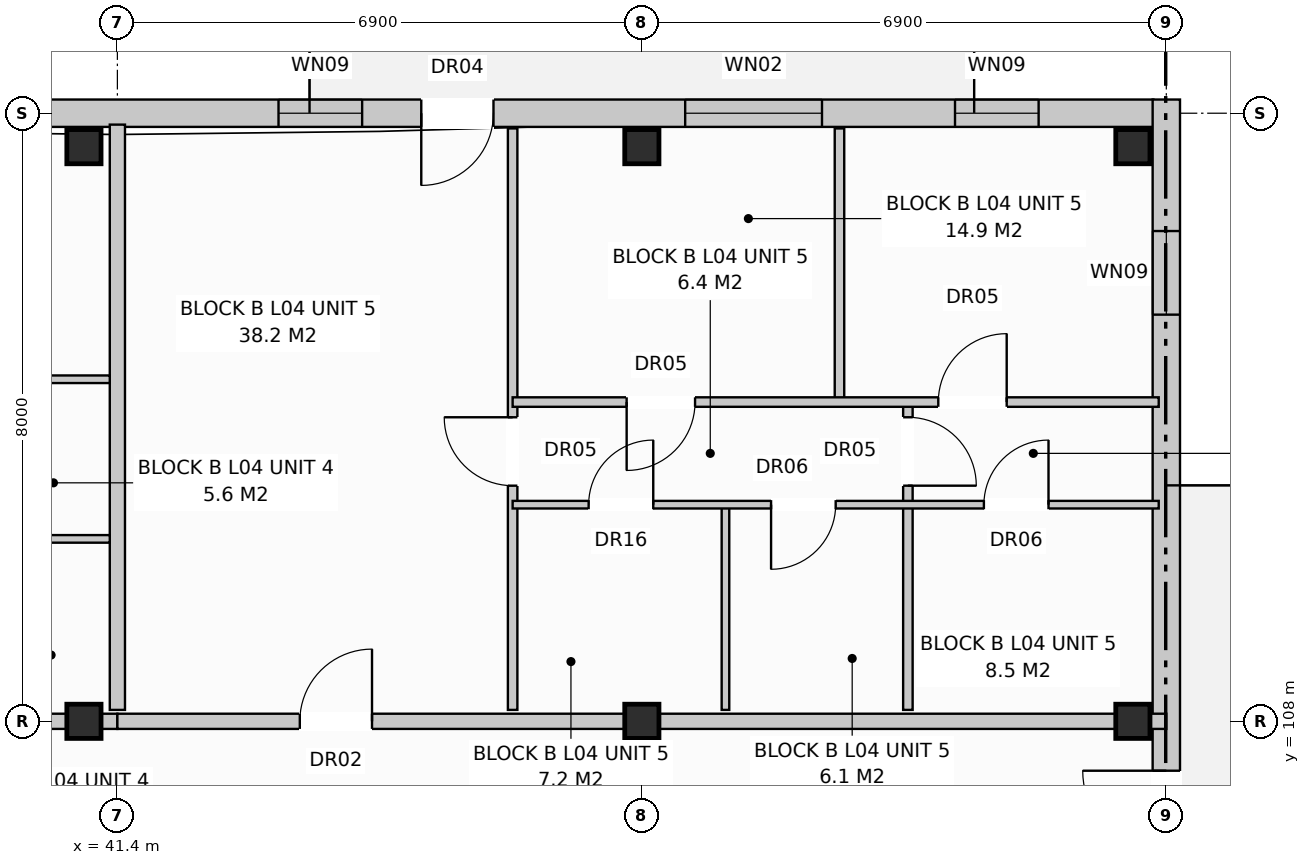
"""IFC4 building model, lengths in metres.
Left out: names, types, materials, properties, quantities, classifications, styles, units other than length and angle.
Written with IfcOpenShell. Run it as: python <this file> out.ifc"""

import sys

from ifc_helpers import new_model, si_unit, direction, frame, frame_2d, origin, origin_with_axes, origin_2d, place, context, subcontext, project, spatial, rectangle, extrude, element, fill, save


model = new_model("IFC4")
c1 = context("Model", 3, precision=1e-05, world=origin(), true_north=direction((0.0, 1.0)))
c2 = subcontext(c1, "Body", "Model", "MODEL_VIEW")
j1 = project(units=[si_unit("LENGTHUNIT", "METRE"), si_unit("PLANEANGLEUNIT", "RADIAN")], contexts=[c1])
p1 = place(None, origin())
s1 = spatial("IfcSite", under=j1, at=p1, CompositionType="ELEMENT")
p2 = place(p1, origin())
s2 = spatial("IfcBuilding", under=s1, at=p2, CompositionType="ELEMENT")
p3 = place(p2, frame((0.0, 0.0, 14.4)))
s3 = spatial("IfcBuildingStorey", under=s2, at=p3, CompositionType="ELEMENT", Elevation=14.4)
for number, where, z_axis, x_axis in (
    (1, (40.96, 108.0, 0.0), (0.0, 0.0, 1.0), (1.0, 0.0, 0.0)),
    (2, (40.96, 115.56, 0.0), (0.0, 0.0, 1.0), (1.0, 0.0, 0.0)),
    (3, (48.3, 108.0, 0.0), (0.0, 0.0, 1.0), (1.0, 0.0, 0.0)),
    (4, (48.3, 115.56, 0.0), (0.0, 0.0, 1.0), (1.0, 0.0, 0.0)),
    (5, (54.76, 108.0, 0.0), (0.0, 0.0, 1.0), (1.0, 0.0, 0.0)),
    (6, (54.76, 115.56, 0.0), (0.0, 0.0, 1.0), (1.0, 0.0, 0.0)),
):
    element("IfcColumn", number, at=place(p3, frame(where, z_axis=z_axis, x_axis=x_axis)), inside=s3, PredefinedType="COLUMN", context=c2, shape_type="SweptSolid", body=[
        extrude(rectangle(XDim=0.45, YDim=0.45, at=origin_2d()), origin(), (0.0, 0.0, 1.0), 3.2),
    ])
p4 = place(p3, frame((0.17, 116.0, 0.0), z_axis=(0.0, 0.0, 1.0), x_axis=(1.0, 0.0, 0.0)))
e7 = element("IfcWall", 7, at=p4, inside=s3, PredefinedType="STANDARD", context=c2, shape_type="SweptSolid", body=[
    extrude(rectangle(XDim=54.86, YDim=0.36, at=frame_2d((27.43, 0.0))), origin(), (0.0, 0.0, 1.0), 2.94),
])
p5 = place(p4, frame((3.815, 0.0, 0.0)))
e8 = element("IfcOpeningElement", 8, at=p5, cuts=e7, PredefinedType="OPENING", context=c2, shape_type="SweptSolid", body=[
    extrude(rectangle(XDim=0.95, YDim=2.1, at=frame_2d((0.475, 1.05))), frame((0.0, 0.192, 0.0), z_axis=(0.0, -1.0, 0.0), x_axis=(1.0, 0.0, 0.0)), (0.0, 0.0, 1.0), 0.384),
])
p6 = place(p4, frame((16.615, 0.0, 0.0)))
e9 = element("IfcOpeningElement", 9, at=p6, cuts=e7, PredefinedType="OPENING", context=c2, shape_type="SweptSolid", body=[
    extrude(rectangle(XDim=0.95, YDim=2.1, at=frame_2d((0.475, 1.05))), frame((0.0, 0.192, 0.0), z_axis=(0.0, -1.0, 0.0), x_axis=(1.0, 0.0, 0.0)), (0.0, 0.0, 1.0), 0.384),
])
p7 = place(p4, frame((30.115, 0.0, 0.0)))
e10 = element("IfcOpeningElement", 10, at=p7, cuts=e7, PredefinedType="OPENING", context=c2, shape_type="SweptSolid", body=[
    extrude(rectangle(XDim=0.95, YDim=2.1, at=frame_2d((0.475, 1.05))), frame((0.0, 0.192, 0.0), z_axis=(0.0, -1.0, 0.0), x_axis=(1.0, 0.0, 0.0)), (0.0, 0.0, 1.0), 0.384),
])
p8 = place(p4, frame((45.228, 0.0, 0.0)))
e11 = element("IfcOpeningElement", 11, at=p8, cuts=e7, PredefinedType="OPENING", context=c2, shape_type="SweptSolid", body=[
    extrude(rectangle(XDim=0.95, YDim=2.1, at=frame_2d((0.475, 1.05))), frame((0.0, 0.192, 0.0), z_axis=(0.0, -1.0, 0.0), x_axis=(1.0, 0.0, 0.0)), (0.0, 0.0, 1.0), 0.384),
])
p9 = place(p4, frame((1.55, 0.0, 0.8)))
e12 = element("IfcOpeningElement", 12, at=p9, cuts=e7, PredefinedType="OPENING", context=c2, shape_type="SweptSolid", body=[
    extrude(rectangle(XDim=1.9, YDim=1.85, at=frame_2d((0.95, 0.925))), frame((0.0, 0.192, 0.0), z_axis=(0.0, -1.0, 0.0), x_axis=(1.0, 0.0, 0.0)), (0.0, 0.0, 1.0), 0.384),
])
p10 = place(p4, frame((7.183, 0.0, 0.8)))
e13 = element("IfcOpeningElement", 13, at=p10, cuts=e7, PredefinedType="OPENING", context=c2, shape_type="SweptSolid", body=[
    extrude(rectangle(XDim=1.95, YDim=1.65, at=frame_2d((0.975, 0.825))), frame((0.0, 0.192, 0.0), z_axis=(0.0, -1.0, 0.0), x_axis=(1.0, 0.0, 0.0)), (0.0, 0.0, 1.0), 0.384),
])
p11 = place(p4, frame((10.85, 0.0, 0.72)))
e14 = element("IfcOpeningElement", 14, at=p11, cuts=e7, PredefinedType="OPENING", context=c2, shape_type="SweptSolid", body=[
    extrude(rectangle(XDim=1.1, YDim=1.5, at=frame_2d((0.55, 0.75))), frame((0.0, 0.192, 0.0), z_axis=(0.0, -1.0, 0.0), x_axis=(1.0, 0.0, 0.0)), (0.0, 0.0, 1.0), 0.384),
])
p12 = place(p4, frame((14.85, 0.0, 0.72)))
e15 = element("IfcOpeningElement", 15, at=p12, cuts=e7, PredefinedType="OPENING", context=c2, shape_type="SweptSolid", body=[
    extrude(rectangle(XDim=1.1, YDim=1.5, at=frame_2d((0.55, 0.75))), frame((0.0, 0.192, 0.0), z_axis=(0.0, -1.0, 0.0), x_axis=(1.0, 0.0, 0.0)), (0.0, 0.0, 1.0), 0.384),
])
p13 = place(p4, frame((18.125, 0.0, 0.8)))
e16 = element("IfcOpeningElement", 16, at=p13, cuts=e7, PredefinedType="OPENING", context=c2, shape_type="SweptSolid", body=[
    extrude(rectangle(XDim=1.95, YDim=1.65, at=frame_2d((0.975, 0.825))), frame((0.0, 0.192, 0.0), z_axis=(0.0, -1.0, 0.0), x_axis=(1.0, 0.0, 0.0)), (0.0, 0.0, 1.0), 0.384),
])
p14 = place(p4, frame((23.9, 0.0, 0.8)))
e17 = element("IfcOpeningElement", 17, at=p14, cuts=e7, PredefinedType="OPENING", context=c2, shape_type="SweptSolid", body=[
    extrude(rectangle(XDim=1.8, YDim=1.7, at=frame_2d((0.9, 0.85))), frame((0.0, 0.192, 0.0), z_axis=(0.0, -1.0, 0.0), x_axis=(1.0, 0.0, 0.0)), (0.0, 0.0, 1.0), 0.384),
])
p15 = place(p4, frame((28.35, 0.0, 0.72)))
e18 = element("IfcOpeningElement", 18, at=p15, cuts=e7, PredefinedType="OPENING", context=c2, shape_type="SweptSolid", body=[
    extrude(rectangle(XDim=1.1, YDim=1.5, at=frame_2d((0.55, 0.75))), frame((0.0, 0.192, 0.0), z_axis=(0.0, -1.0, 0.0), x_axis=(1.0, 0.0, 0.0)), (0.0, 0.0, 1.0), 0.384),
])
p16 = place(p4, frame((31.825, 0.0, 0.8)))
e19 = element("IfcOpeningElement", 19, at=p16, cuts=e7, PredefinedType="OPENING", context=c2, shape_type="SweptSolid", body=[
    extrude(rectangle(XDim=1.95, YDim=1.65, at=frame_2d((0.975, 0.825))), frame((0.0, 0.192, 0.0), z_axis=(0.0, -1.0, 0.0), x_axis=(1.0, 0.0, 0.0)), (0.0, 0.0, 1.0), 0.384),
])
p17 = place(p4, frame((35.4, 0.0, 0.8)))
e20 = element("IfcOpeningElement", 20, at=p17, cuts=e7, PredefinedType="OPENING", context=c2, shape_type="SweptSolid", body=[
    extrude(rectangle(XDim=1.8, YDim=1.7, at=frame_2d((0.9, 0.85))), frame((0.0, 0.192, 0.0), z_axis=(0.0, -1.0, 0.0), x_axis=(1.0, 0.0, 0.0)), (0.0, 0.0, 1.0), 0.384),
])
p18 = place(p4, frame((39.15, 0.0, 0.72)))
e21 = element("IfcOpeningElement", 21, at=p18, cuts=e7, PredefinedType="OPENING", context=c2, shape_type="SweptSolid", body=[
    extrude(rectangle(XDim=1.1, YDim=1.5, at=frame_2d((0.55, 0.75))), frame((0.0, 0.192, 0.0), z_axis=(0.0, -1.0, 0.0), x_axis=(1.0, 0.0, 0.0)), (0.0, 0.0, 1.0), 0.384),
])
p19 = place(p4, frame((43.35, 0.0, 0.72)))
e22 = element("IfcOpeningElement", 22, at=p19, cuts=e7, PredefinedType="OPENING", context=c2, shape_type="SweptSolid", body=[
    extrude(rectangle(XDim=1.1, YDim=1.5, at=frame_2d((0.55, 0.75))), frame((0.0, 0.192, 0.0), z_axis=(0.0, -1.0, 0.0), x_axis=(1.0, 0.0, 0.0)), (0.0, 0.0, 1.0), 0.384),
])
p20 = place(p4, frame((48.7, 0.0, 0.8)))
e23 = element("IfcOpeningElement", 23, at=p20, cuts=e7, PredefinedType="OPENING", context=c2, shape_type="SweptSolid", body=[
    extrude(rectangle(XDim=1.8, YDim=1.7, at=frame_2d((0.9, 0.85))), frame((0.0, 0.192, 0.0), z_axis=(0.0, -1.0, 0.0), x_axis=(1.0, 0.0, 0.0)), (0.0, 0.0, 1.0), 0.384),
])
p21 = place(p4, frame((52.25, 0.0, 0.72)))
e24 = element("IfcOpeningElement", 24, at=p21, cuts=e7, PredefinedType="OPENING", context=c2, shape_type="SweptSolid", body=[
    extrude(rectangle(XDim=1.1, YDim=1.5, at=frame_2d((0.55, 0.75))), frame((0.0, 0.192, 0.0), z_axis=(0.0, -1.0, 0.0), x_axis=(1.0, 0.0, 0.0)), (0.0, 0.0, 1.0), 0.384),
])
p22 = place(p3, frame((55.2, 97.42, 0.0), z_axis=(0.0, 0.0, 1.0), x_axis=(0.0, 1.0, 0.0)))
e25 = element("IfcWall", 25, at=p22, inside=s3, PredefinedType="STANDARD", context=c2, shape_type="SweptSolid", body=[
    extrude(rectangle(XDim=18.76, YDim=0.36, at=frame_2d((9.38, 0.0))), origin(), (0.0, 0.0, 1.0), 2.94),
])
p23 = place(p22, frame((8.83, 0.0, 0.0)))
e26 = element("IfcOpeningElement", 26, at=p23, cuts=e25, PredefinedType="OPENING", context=c2, shape_type="SweptSolid", body=[
    extrude(rectangle(XDim=1.1, YDim=2.1, at=frame_2d((0.55, 1.05))), frame((0.0, 0.192, 0.0), z_axis=(0.0, -1.0, 0.0), x_axis=(1.0, 0.0, 0.0)), (0.0, 0.0, 1.0), 0.384),
])
p24 = place(p22, frame((1.73, 0.0, 0.72)))
e27 = element("IfcOpeningElement", 27, at=p24, cuts=e25, PredefinedType="OPENING", context=c2, shape_type="SweptSolid", body=[
    extrude(rectangle(XDim=1.1, YDim=1.5, at=frame_2d((0.55, 0.75))), frame((0.0, 0.192, 0.0), z_axis=(0.0, -1.0, 0.0), x_axis=(1.0, 0.0, 0.0)), (0.0, 0.0, 1.0), 0.384),
])
p25 = place(p22, frame((15.93, 0.0, 0.72)))
e28 = element("IfcOpeningElement", 28, at=p25, cuts=e25, PredefinedType="OPENING", context=c2, shape_type="SweptSolid", body=[
    extrude(rectangle(XDim=1.1, YDim=1.5, at=frame_2d((0.55, 0.75))), frame((0.0, 0.192, 0.0), z_axis=(0.0, -1.0, 0.0), x_axis=(1.0, 0.0, 0.0)), (0.0, 0.0, 1.0), 0.384),
])
p26 = place(p3, frame((41.4, 108.15, 0.0), z_axis=(0.0, 0.0, 1.0), x_axis=(0.0, 1.0, 0.0)))
e29 = element("IfcWall", 29, at=p26, inside=s3, PredefinedType="PARTITIONING", context=c2, shape_type="SweptSolid", body=[
    extrude(rectangle(XDim=7.7, YDim=0.2, at=frame_2d((3.85, 0.0))), origin(), (0.0, 0.0, 1.0), 2.94),
])
p27 = place(p3, frame((34.5, 108.0, 0.0), z_axis=(0.0, 0.0, 1.0), x_axis=(1.0, 0.0, 0.0)))
e30 = element("IfcWall", 30, at=p27, inside=s3, PredefinedType="PARTITIONING", context=c2, shape_type="SweptSolid", body=[
    extrude(rectangle(XDim=6.9, YDim=0.2, at=frame_2d((3.45, 0.0))), origin(), (0.0, 0.0, 1.0), 2.38),
])
p28 = place(p27, frame((2.0, 0.0, 0.0)))
e31 = element("IfcOpeningElement", 31, at=p28, cuts=e30, PredefinedType="OPENING", context=c2, shape_type="SweptSolid", body=[
    extrude(rectangle(XDim=0.95, YDim=2.15, at=frame_2d((0.475, 1.075))), frame((0.0, 0.112, 0.0), z_axis=(0.0, -1.0, 0.0), x_axis=(1.0, 0.0, 0.0)), (0.0, 0.0, 1.0), 0.224),
])
for number, where, z_axis, x_axis in (
    (32, (38.4, 110.4, 0.0), (0.0, 0.0, 1.0), (1.0, 0.0, 0.0)),
    (33, (38.4, 112.5, 0.0), (0.0, 0.0, 1.0), (1.0, 0.0, 0.0)),
):
    element("IfcWall", number, at=place(p3, frame(where, z_axis=z_axis, x_axis=x_axis)), inside=s3, PredefinedType="PARTITIONING", context=c2, shape_type="SweptSolid", body=[
        extrude(rectangle(XDim=2.9, YDim=0.1, at=frame_2d((1.45, 0.0))), origin(), (0.0, 0.0, 1.0), 2.94),
    ])
p29 = place(p3, frame((41.4, 108.0, 0.0), z_axis=(0.0, 0.0, 1.0), x_axis=(1.0, 0.0, 0.0)))
e34 = element("IfcWall", 34, at=p29, inside=s3, PredefinedType="PARTITIONING", context=c2, shape_type="SweptSolid", body=[
    extrude(rectangle(XDim=13.8, YDim=0.2, at=frame_2d((6.9, 0.0))), origin(), (0.0, 0.0, 1.0), 2.38),
])
p30 = place(p29, frame((2.4, 0.0, 0.0)))
e35 = element("IfcOpeningElement", 35, at=p30, cuts=e34, PredefinedType="OPENING", context=c2, shape_type="SweptSolid", body=[
    extrude(rectangle(XDim=0.95, YDim=2.15, at=frame_2d((0.475, 1.075))), frame((0.0, 0.112, 0.0), z_axis=(0.0, -1.0, 0.0), x_axis=(1.0, 0.0, 0.0)), (0.0, 0.0, 1.0), 0.224),
])
p31 = place(p3, frame((46.6, 108.15, 0.0), z_axis=(0.0, 0.0, 1.0), x_axis=(0.0, 1.0, 0.0)))
e36 = element("IfcWall", 36, at=p31, inside=s3, PredefinedType="PARTITIONING", context=c2, shape_type="SweptSolid", body=[
    extrude(rectangle(XDim=7.65, YDim=0.125, at=frame_2d((3.825, 0.0))), origin(), (0.0, 0.0, 1.0), 2.94),
])
p32 = place(p31, frame((2.95, 0.0, 0.0)))
e37 = element("IfcOpeningElement", 37, at=p32, cuts=e36, PredefinedType="OPENING", context=c2, shape_type="SweptSolid", body=[
    extrude(rectangle(XDim=0.9, YDim=2.1, at=frame_2d((0.45, 1.05))), frame((0.0, 0.074, 0.0), z_axis=(0.0, -1.0, 0.0), x_axis=(1.0, 0.0, 0.0)), (0.0, 0.0, 1.0), 0.149),
])
p33 = place(p3, frame((49.4, 108.15, 0.0), z_axis=(0.0, 0.0, 1.0), x_axis=(0.0, 1.0, 0.0)))
e38 = element("IfcWall", 38, at=p33, inside=s3, PredefinedType="PARTITIONING", context=c2, shape_type="SweptSolid", body=[
    extrude(rectangle(XDim=2.7, YDim=0.1, at=frame_2d((1.35, 0.0))), origin(), (0.0, 0.0, 1.0), 2.94),
])
p34 = place(p3, frame((51.8, 108.15, 0.0), z_axis=(0.0, 0.0, 1.0), x_axis=(0.0, 1.0, 0.0)))
e39 = element("IfcWall", 39, at=p34, inside=s3, PredefinedType="PARTITIONING", context=c2, shape_type="SweptSolid", body=[
    extrude(rectangle(XDim=4.05, YDim=0.125, at=frame_2d((2.025, 0.0))), origin(), (0.0, 0.0, 1.0), 2.59),
])
p35 = place(p34, frame((2.95, 0.0, 0.0)))
e40 = element("IfcOpeningElement", 40, at=p35, cuts=e39, PredefinedType="OPENING", context=c2, shape_type="SweptSolid", body=[
    extrude(rectangle(XDim=0.9, YDim=2.1, at=frame_2d((0.45, 1.05))), frame((0.0, 0.074, 0.0), z_axis=(0.0, -1.0, 0.0), x_axis=(1.0, 0.0, 0.0)), (0.0, 0.0, 1.0), 0.149),
])
p36 = place(p3, frame((50.9, 112.2, 0.0), z_axis=(0.0, 0.0, 1.0), x_axis=(0.0, 1.0, 0.0)))
e41 = element("IfcWall", 41, at=p36, inside=s3, PredefinedType="PARTITIONING", context=c2, shape_type="SweptSolid", body=[
    extrude(rectangle(XDim=3.6, YDim=0.125, at=frame_2d((1.8, 0.0))), origin(), (0.0, 0.0, 1.0), 2.94),
])
p37 = place(p3, frame((46.6, 110.85, 0.0), z_axis=(0.0, 0.0, 1.0), x_axis=(1.0, 0.0, 0.0)))
e42 = element("IfcWall", 42, at=p37, inside=s3, PredefinedType="PARTITIONING", context=c2, shape_type="SweptSolid", body=[
    extrude(rectangle(XDim=8.5, YDim=0.1, at=frame_2d((4.25, 0.0))), origin(), (0.0, 0.0, 1.0), 2.94),
])
p38 = place(p37, frame((1.0, 0.0, 0.0)))
e43 = element("IfcOpeningElement", 43, at=p38, cuts=e42, PredefinedType="OPENING", context=c2, shape_type="SweptSolid", body=[
    extrude(rectangle(XDim=0.85, YDim=2.1, at=frame_2d((0.425, 1.05))), frame((0.0, 0.062, 0.0), z_axis=(0.0, -1.0, 0.0), x_axis=(1.0, 0.0, 0.0)), (0.0, 0.0, 1.0), 0.124),
])
p39 = place(p37, frame((3.4, 0.0, 0.0)))
e44 = element("IfcOpeningElement", 44, at=p39, cuts=e42, PredefinedType="OPENING", context=c2, shape_type="SweptSolid", body=[
    extrude(rectangle(XDim=0.85, YDim=2.05, at=frame_2d((0.425, 1.025))), frame((0.0, 0.062, 0.0), z_axis=(0.0, -1.0, 0.0), x_axis=(1.0, 0.0, 0.0)), (0.0, 0.0, 1.0), 0.124),
])
p40 = place(p37, frame((6.2, 0.0, 0.0)))
e45 = element("IfcOpeningElement", 45, at=p40, cuts=e42, PredefinedType="OPENING", context=c2, shape_type="SweptSolid", body=[
    extrude(rectangle(XDim=0.85, YDim=2.05, at=frame_2d((0.425, 1.025))), frame((0.0, 0.062, 0.0), z_axis=(0.0, -1.0, 0.0), x_axis=(1.0, 0.0, 0.0)), (0.0, 0.0, 1.0), 0.124),
])
p41 = place(p3, frame((46.6, 112.2, 0.0), z_axis=(0.0, 0.0, 1.0), x_axis=(1.0, 0.0, 0.0)))
e46 = element("IfcWall", 46, at=p41, inside=s3, PredefinedType="PARTITIONING", context=c2, shape_type="SweptSolid", body=[
    extrude(rectangle(XDim=8.5, YDim=0.125, at=frame_2d((4.25, 0.0))), origin(), (0.0, 0.0, 1.0), 2.94),
])
p42 = place(p41, frame((1.5, 0.0, 0.0)))
e47 = element("IfcOpeningElement", 47, at=p42, cuts=e46, PredefinedType="OPENING", context=c2, shape_type="SweptSolid", body=[
    extrude(rectangle(XDim=0.9, YDim=2.1, at=frame_2d((0.45, 1.05))), frame((0.0, 0.074, 0.0), z_axis=(0.0, -1.0, 0.0), x_axis=(1.0, 0.0, 0.0)), (0.0, 0.0, 1.0), 0.149),
])
p43 = place(p41, frame((5.6, 0.0, 0.0)))
e48 = element("IfcOpeningElement", 48, at=p43, cuts=e46, PredefinedType="OPENING", context=c2, shape_type="SweptSolid", body=[
    extrude(rectangle(XDim=0.9, YDim=2.1, at=frame_2d((0.45, 1.05))), frame((0.0, 0.074, 0.0), z_axis=(0.0, -1.0, 0.0), x_axis=(1.0, 0.0, 0.0)), (0.0, 0.0, 1.0), 0.149),
])
p44 = place(p8, frame((0.95, 0.0, 0.0), z_axis=(0.0, 0.0, 1.0), x_axis=(-1.0, 0.0, 0.0)))
e49 = element("IfcDoor", 49, at=p44, inside=s3, OperationType="SINGLE_SWING_LEFT", PredefinedType="DOOR", context=c2, shape_type="SweptSolid", body=[
    extrude(rectangle(XDim=0.95, YDim=2.1, at=frame_2d((0.475, 1.05))), frame((0.0, 0.025, 0.0), z_axis=(0.0, -1.0, 0.0), x_axis=(1.0, 0.0, 0.0)), (0.0, 0.0, 1.0), 0.05),
])
fill(e11, e49)
p45 = place(p19, origin_with_axes())
e50 = element("IfcWindow", 50, at=p45, inside=s3, PartitioningType="SINGLE_PANEL", PredefinedType="WINDOW", context=c2, shape_type="SweptSolid", body=[
    extrude(rectangle(XDim=1.1, YDim=1.5, at=frame_2d((0.55, 0.75))), frame((0.0, 0.03, 0.0), z_axis=(0.0, -1.0, 0.0), x_axis=(1.0, 0.0, 0.0)), (0.0, 0.0, 1.0), 0.06),
])
fill(e22, e50)
p46 = place(p20, origin_with_axes())
e51 = element("IfcWindow", 51, at=p46, inside=s3, PartitioningType="SINGLE_PANEL", PredefinedType="WINDOW", context=c2, shape_type="SweptSolid", body=[
    extrude(rectangle(XDim=1.8, YDim=1.7, at=frame_2d((0.9, 0.85))), frame((0.0, 0.03, 0.0), z_axis=(0.0, -1.0, 0.0), x_axis=(1.0, 0.0, 0.0)), (0.0, 0.0, 1.0), 0.06),
])
fill(e23, e51)
p47 = place(p21, origin_with_axes())
e52 = element("IfcWindow", 52, at=p47, inside=s3, PartitioningType="SINGLE_PANEL", PredefinedType="WINDOW", context=c2, shape_type="SweptSolid", body=[
    extrude(rectangle(XDim=1.1, YDim=1.5, at=frame_2d((0.55, 0.75))), frame((0.0, 0.03, 0.0), z_axis=(0.0, -1.0, 0.0), x_axis=(1.0, 0.0, 0.0)), (0.0, 0.0, 1.0), 0.06),
])
fill(e24, e52)
p48 = place(p23, origin_with_axes())
e53 = element("IfcDoor", 53, at=p48, inside=s3, OperationType="SINGLE_SWING_RIGHT", PredefinedType="DOOR", context=c2, shape_type="SweptSolid", body=[
    extrude(rectangle(XDim=1.1, YDim=2.1, at=frame_2d((0.55, 1.05))), frame((0.0, 0.025, 0.0), z_axis=(0.0, -1.0, 0.0), x_axis=(1.0, 0.0, 0.0)), (0.0, 0.0, 1.0), 0.05),
])
fill(e26, e53)
p49 = place(p25, origin_with_axes())
e54 = element("IfcWindow", 54, at=p49, inside=s3, PartitioningType="SINGLE_PANEL", PredefinedType="WINDOW", context=c2, shape_type="SweptSolid", body=[
    extrude(rectangle(XDim=1.1, YDim=1.5, at=frame_2d((0.55, 0.75))), frame((0.0, 0.03, 0.0), z_axis=(0.0, -1.0, 0.0), x_axis=(1.0, 0.0, 0.0)), (0.0, 0.0, 1.0), 0.06),
])
fill(e28, e54)
p50 = place(p30, origin_with_axes())
e55 = element("IfcDoor", 55, at=p50, inside=s3, OperationType="SINGLE_SWING_RIGHT", PredefinedType="DOOR", context=c2, shape_type="SweptSolid", body=[
    extrude(rectangle(XDim=0.95, YDim=2.15, at=frame_2d((0.475, 1.075))), frame((0.0, 0.025, 0.0), z_axis=(0.0, -1.0, 0.0), x_axis=(1.0, 0.0, 0.0)), (0.0, 0.0, 1.0), 0.05),
])
fill(e35, e55)
p51 = place(p32, origin_with_axes())
e56 = element("IfcDoor", 56, at=p51, inside=s3, OperationType="SINGLE_SWING_RIGHT", PredefinedType="DOOR", context=c2, shape_type="SweptSolid", body=[
    extrude(rectangle(XDim=0.9, YDim=2.1, at=frame_2d((0.45, 1.05))), frame((0.0, 0.025, 0.0), z_axis=(0.0, -1.0, 0.0), x_axis=(1.0, 0.0, 0.0)), (0.0, 0.0, 1.0), 0.05),
])
fill(e37, e56)
p52 = place(p35, frame((0.9, 0.0, 0.0), z_axis=(0.0, 0.0, 1.0), x_axis=(-1.0, 0.0, 0.0)))
e57 = element("IfcDoor", 57, at=p52, inside=s3, OperationType="SINGLE_SWING_LEFT", PredefinedType="DOOR", context=c2, shape_type="SweptSolid", body=[
    extrude(rectangle(XDim=0.9, YDim=2.1, at=frame_2d((0.45, 1.05))), frame((0.0, 0.025, 0.0), z_axis=(0.0, -1.0, 0.0), x_axis=(1.0, 0.0, 0.0)), (0.0, 0.0, 1.0), 0.05),
])
fill(e40, e57)
p53 = place(p38, origin_with_axes())
e58 = element("IfcDoor", 58, at=p53, inside=s3, OperationType="SINGLE_SWING_RIGHT", PredefinedType="DOOR", context=c2, shape_type="SweptSolid", body=[
    extrude(rectangle(XDim=0.85, YDim=2.1, at=frame_2d((0.425, 1.05))), frame((0.0, 0.025, 0.0), z_axis=(0.0, -1.0, 0.0), x_axis=(1.0, 0.0, 0.0)), (0.0, 0.0, 1.0), 0.05),
])
fill(e43, e58)
p54 = place(p39, frame((0.85, 0.0, 0.0), z_axis=(0.0, 0.0, 1.0), x_axis=(-1.0, 0.0, 0.0)))
e59 = element("IfcDoor", 59, at=p54, inside=s3, OperationType="SINGLE_SWING_LEFT", PredefinedType="DOOR", context=c2, shape_type="SweptSolid", body=[
    extrude(rectangle(XDim=0.85, YDim=2.05, at=frame_2d((0.425, 1.025))), frame((0.0, 0.025, 0.0), z_axis=(0.0, -1.0, 0.0), x_axis=(1.0, 0.0, 0.0)), (0.0, 0.0, 1.0), 0.05),
])
fill(e44, e59)
p55 = place(p40, origin_with_axes())
e60 = element("IfcDoor", 60, at=p55, inside=s3, OperationType="SINGLE_SWING_RIGHT", PredefinedType="DOOR", context=c2, shape_type="SweptSolid", body=[
    extrude(rectangle(XDim=0.85, YDim=2.05, at=frame_2d((0.425, 1.025))), frame((0.0, 0.025, 0.0), z_axis=(0.0, -1.0, 0.0), x_axis=(1.0, 0.0, 0.0)), (0.0, 0.0, 1.0), 0.05),
])
fill(e45, e60)
p56 = place(p42, frame((0.9, 0.0, 0.0), z_axis=(0.0, 0.0, 1.0), x_axis=(-1.0, 0.0, 0.0)))
e61 = element("IfcDoor", 61, at=p56, inside=s3, OperationType="SINGLE_SWING_LEFT", PredefinedType="DOOR", context=c2, shape_type="SweptSolid", body=[
    extrude(rectangle(XDim=0.9, YDim=2.1, at=frame_2d((0.45, 1.05))), frame((0.0, 0.025, 0.0), z_axis=(0.0, -1.0, 0.0), x_axis=(1.0, 0.0, 0.0)), (0.0, 0.0, 1.0), 0.05),
])
fill(e47, e61)
p57 = place(p43, origin_with_axes())
e62 = element("IfcDoor", 62, at=p57, inside=s3, OperationType="SINGLE_SWING_RIGHT", PredefinedType="DOOR", context=c2, shape_type="SweptSolid", body=[
    extrude(rectangle(XDim=0.9, YDim=2.1, at=frame_2d((0.45, 1.05))), frame((0.0, 0.025, 0.0), z_axis=(0.0, -1.0, 0.0), x_axis=(1.0, 0.0, 0.0)), (0.0, 0.0, 1.0), 0.05),
])
fill(e48, e62)
save(model, sys.argv[1])
